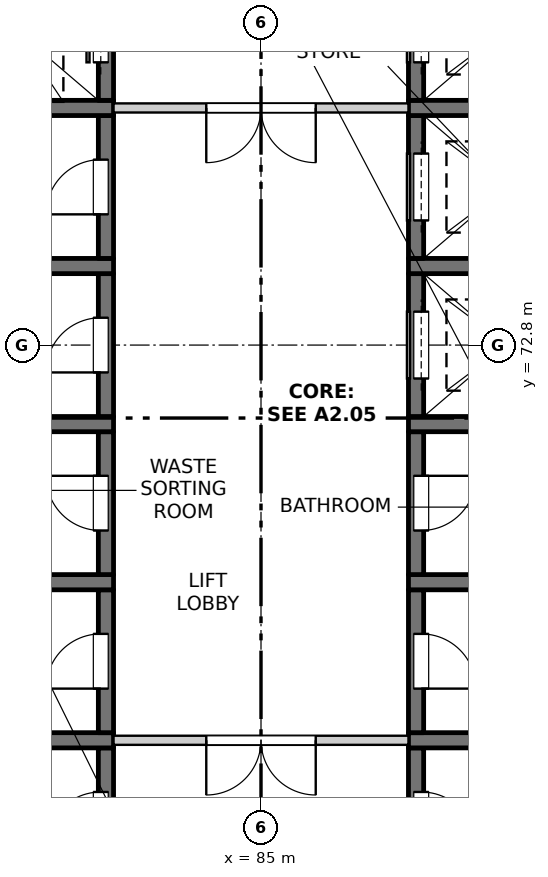
"""IFC4 building model, lengths in metres.
Left out: names, types, materials, properties, quantities, classifications, styles, units other than length and angle.
Written with IfcOpenShell. Run it as: python <this file> out.ifc"""

import sys

from ifc_helpers import new_model, si_unit, direction, frame, frame_2d, origin, place, context, subcontext, project, spatial, rectangle, extrude, element, fill, save


model = new_model("IFC4")
c1 = context("Model", 3, precision=1e-05, world=origin(), true_north=direction((0.0, 1.0)))
c2 = subcontext(c1, "Body", "Model", "MODEL_VIEW")
j1 = project(units=[si_unit("LENGTHUNIT", "METRE"), si_unit("PLANEANGLEUNIT", "RADIAN")], contexts=[c1])
p1 = place(None, origin())
s1 = spatial("IfcSite", under=j1, at=p1, CompositionType="ELEMENT")
p2 = place(p1, origin())
s2 = spatial("IfcBuilding", under=s1, at=p2, CompositionType="ELEMENT")
p3 = place(p2, frame((0.0, 0.0, 231.3)))
s3 = spatial("IfcBuildingStorey", under=s2, at=p3, CompositionType="ELEMENT", Elevation=231.3)
p4 = place(p3, frame((82.45, 63.825, -0.25), z_axis=(0.0, 0.0, 1.0), x_axis=(0.0, 1.0, 0.0)))
e1 = element("IfcWall", 1, at=p4, inside=s3, PredefinedType="SOLIDWALL", context=c2, shape_type="SweptSolid", body=[
    extrude(rectangle(XDim=2.35, YDim=0.25, at=frame_2d((1.175, 0.0))), origin(), (0.0, 0.0, 1.0), 3.4),
])
p5 = place(p4, frame((0.725, 0.0, 0.25)))
e2 = element("IfcOpeningElement", 2, at=p5, cuts=e1, PredefinedType="OPENING", context=c2, shape_type="SweptSolid", body=[
    extrude(rectangle(XDim=0.9, YDim=2.1, at=frame_2d((0.45, 1.05))), frame((0.0, 0.135, 0.0), z_axis=(0.0, -1.0, 0.0), x_axis=(1.0, 0.0, 0.0)), (0.0, 0.0, 1.0), 0.27),
])
p6 = place(p3, frame((79.575, 66.3, -0.25), z_axis=(0.0, 0.0, 1.0), x_axis=(1.0, 0.0, 0.0)))
e3 = element("IfcWall", 3, at=p6, inside=s3, PredefinedType="SOLIDWALL", context=c2, shape_type="SweptSolid", body=[
    extrude(rectangle(XDim=3.0, YDim=0.25, at=frame_2d((1.5, 0.0))), origin(), (0.0, 0.0, 1.0), 3.4),
])
p7 = place(p3, frame((82.45, 66.425, -0.25), z_axis=(0.0, 0.0, 1.0), x_axis=(0.0, 1.0, 0.0)))
e4 = element("IfcWall", 4, at=p7, inside=s3, PredefinedType="SOLIDWALL", context=c2, shape_type="SweptSolid", body=[
    extrude(rectangle(XDim=2.35, YDim=0.25, at=frame_2d((1.175, 0.0))), origin(), (0.0, 0.0, 1.0), 3.4),
])
p8 = place(p7, frame((0.725, 0.0, 0.25)))
e5 = element("IfcOpeningElement", 5, at=p8, cuts=e4, PredefinedType="OPENING", context=c2, shape_type="SweptSolid", body=[
    extrude(rectangle(XDim=0.9, YDim=2.1, at=frame_2d((0.45, 1.05))), frame((0.0, 0.135, 0.0), z_axis=(0.0, -1.0, 0.0), x_axis=(1.0, 0.0, 0.0)), (0.0, 0.0, 1.0), 0.27),
])
p9 = place(p3, frame((79.575, 68.9, -0.25), z_axis=(0.0, 0.0, 1.0), x_axis=(1.0, 0.0, 0.0)))
e6 = element("IfcWall", 6, at=p9, inside=s3, PredefinedType="SOLIDWALL", context=c2, shape_type="SweptSolid", body=[
    extrude(rectangle(XDim=3.0, YDim=0.25, at=frame_2d((1.5, 0.0))), origin(), (0.0, 0.0, 1.0), 3.4),
])
p10 = place(p3, frame((82.45, 69.025, -0.25), z_axis=(0.0, 0.0, 1.0), x_axis=(0.0, 1.0, 0.0)))
e7 = element("IfcWall", 7, at=p10, inside=s3, PredefinedType="SOLIDWALL", context=c2, shape_type="SweptSolid", body=[
    extrude(rectangle(XDim=2.35, YDim=0.25, at=frame_2d((1.175, 0.0))), origin(), (0.0, 0.0, 1.0), 3.4),
])
p11 = place(p10, frame((0.725, 0.0, 0.25)))
e8 = element("IfcOpeningElement", 8, at=p11, cuts=e7, PredefinedType="OPENING", context=c2, shape_type="SweptSolid", body=[
    extrude(rectangle(XDim=0.9, YDim=2.1, at=frame_2d((0.45, 1.05))), frame((0.0, 0.135, 0.0), z_axis=(0.0, -1.0, 0.0), x_axis=(1.0, 0.0, 0.0)), (0.0, 0.0, 1.0), 0.27),
])
p12 = place(p3, frame((79.575, 71.5, -0.25), z_axis=(0.0, 0.0, 1.0), x_axis=(1.0, 0.0, 0.0)))
e9 = element("IfcWall", 9, at=p12, inside=s3, PredefinedType="SOLIDWALL", context=c2, shape_type="SweptSolid", body=[
    extrude(rectangle(XDim=3.0, YDim=0.25, at=frame_2d((1.5, 0.0))), origin(), (0.0, 0.0, 1.0), 3.4),
])
p13 = place(p3, frame((82.45, 71.625, -0.25), z_axis=(0.0, 0.0, 1.0), x_axis=(0.0, 1.0, 0.0)))
e10 = element("IfcWall", 10, at=p13, inside=s3, PredefinedType="SOLIDWALL", context=c2, shape_type="SweptSolid", body=[
    extrude(rectangle(XDim=2.35, YDim=0.25, at=frame_2d((1.175, 0.0))), origin(), (0.0, 0.0, 1.0), 3.4),
])
p14 = place(p13, frame((0.725, 0.0, 0.25)))
e11 = element("IfcOpeningElement", 11, at=p14, cuts=e10, PredefinedType="OPENING", context=c2, shape_type="SweptSolid", body=[
    extrude(rectangle(XDim=0.9, YDim=2.1, at=frame_2d((0.45, 1.05))), frame((0.0, 0.135, 0.0), z_axis=(0.0, -1.0, 0.0), x_axis=(1.0, 0.0, 0.0)), (0.0, 0.0, 1.0), 0.27),
])
p15 = place(p3, frame((79.575, 74.1, -0.25), z_axis=(0.0, 0.0, 1.0), x_axis=(1.0, 0.0, 0.0)))
e12 = element("IfcWall", 12, at=p15, inside=s3, PredefinedType="SOLIDWALL", context=c2, shape_type="SweptSolid", body=[
    extrude(rectangle(XDim=3.0, YDim=0.25, at=frame_2d((1.5, 0.0))), origin(), (0.0, 0.0, 1.0), 3.4),
])
p16 = place(p3, frame((82.45, 74.225, -0.25), z_axis=(0.0, 0.0, 1.0), x_axis=(0.0, 1.0, 0.0)))
e13 = element("IfcWall", 13, at=p16, inside=s3, PredefinedType="SOLIDWALL", context=c2, shape_type="SweptSolid", body=[
    extrude(rectangle(XDim=2.35, YDim=0.25, at=frame_2d((1.175, 0.0))), origin(), (0.0, 0.0, 1.0), 3.4),
])
p17 = place(p16, frame((0.725, 0.0, 0.25)))
e14 = element("IfcOpeningElement", 14, at=p17, cuts=e13, PredefinedType="OPENING", context=c2, shape_type="SweptSolid", body=[
    extrude(rectangle(XDim=0.9, YDim=2.1, at=frame_2d((0.45, 1.05))), frame((0.0, 0.135, 0.0), z_axis=(0.0, -1.0, 0.0), x_axis=(1.0, 0.0, 0.0)), (0.0, 0.0, 1.0), 0.27),
])
p18 = place(p3, frame((79.575, 76.7, -0.25), z_axis=(0.0, 0.0, 1.0), x_axis=(1.0, 0.0, 0.0)))
e15 = element("IfcWall", 15, at=p18, inside=s3, PredefinedType="SOLIDWALL", context=c2, shape_type="SweptSolid", body=[
    extrude(rectangle(XDim=3.0, YDim=0.25, at=frame_2d((1.5, 0.0))), origin(), (0.0, 0.0, 1.0), 3.4),
])
p19 = place(p3, frame((82.45, 76.825, -0.25), z_axis=(0.0, 0.0, 1.0), x_axis=(0.0, 1.0, 0.0)))
e16 = element("IfcWall", 16, at=p19, inside=s3, PredefinedType="SOLIDWALL", context=c2, shape_type="SweptSolid", body=[
    extrude(rectangle(XDim=2.35, YDim=0.25, at=frame_2d((1.175, 0.0))), origin(), (0.0, 0.0, 1.0), 3.4),
])
p20 = place(p19, frame((0.625, 0.0, 0.25)))
e17 = element("IfcOpeningElement", 17, at=p20, cuts=e16, PredefinedType="OPENING", context=c2, shape_type="SweptSolid", body=[
    extrude(rectangle(XDim=1.1, YDim=2.1, at=frame_2d((0.55, 1.05))), frame((0.0, 0.135, 0.0), z_axis=(0.0, -1.0, 0.0), x_axis=(1.0, 0.0, 0.0)), (0.0, 0.0, 1.0), 0.27),
])
p21 = place(p3, frame((87.55, 63.825, -0.25), z_axis=(0.0, 0.0, 1.0), x_axis=(0.0, 1.0, 0.0)))
e18 = element("IfcWall", 18, at=p21, inside=s3, PredefinedType="SOLIDWALL", context=c2, shape_type="SweptSolid", body=[
    extrude(rectangle(XDim=2.35, YDim=0.25, at=frame_2d((1.175, 0.0))), origin(), (0.0, 0.0, 1.0), 3.4),
])
p22 = place(p21, frame((0.725, 0.0, 0.25)))
e19 = element("IfcOpeningElement", 19, at=p22, cuts=e18, PredefinedType="OPENING", context=c2, shape_type="SweptSolid", body=[
    extrude(rectangle(XDim=0.9, YDim=2.1, at=frame_2d((0.45, 1.05))), frame((0.0, 0.135, 0.0), z_axis=(0.0, -1.0, 0.0), x_axis=(1.0, 0.0, 0.0)), (0.0, 0.0, 1.0), 0.27),
])
p23 = place(p3, frame((87.425, 66.3, -0.25), z_axis=(0.0, 0.0, 1.0), x_axis=(1.0, 0.0, 0.0)))
e20 = element("IfcWall", 20, at=p23, inside=s3, PredefinedType="SOLIDWALL", context=c2, shape_type="SweptSolid", body=[
    extrude(rectangle(XDim=3.0, YDim=0.25, at=frame_2d((1.5, 0.0))), origin(), (0.0, 0.0, 1.0), 3.4),
])
p24 = place(p3, frame((87.55, 66.425, -0.25), z_axis=(0.0, 0.0, 1.0), x_axis=(0.0, 1.0, 0.0)))
e21 = element("IfcWall", 21, at=p24, inside=s3, PredefinedType="SOLIDWALL", context=c2, shape_type="SweptSolid", body=[
    extrude(rectangle(XDim=2.35, YDim=0.25, at=frame_2d((1.175, 0.0))), origin(), (0.0, 0.0, 1.0), 3.4),
])
p25 = place(p24, frame((0.725, 0.0, 0.25)))
e22 = element("IfcOpeningElement", 22, at=p25, cuts=e21, PredefinedType="OPENING", context=c2, shape_type="SweptSolid", body=[
    extrude(rectangle(XDim=0.9, YDim=2.1, at=frame_2d((0.45, 1.05))), frame((0.0, 0.135, 0.0), z_axis=(0.0, -1.0, 0.0), x_axis=(1.0, 0.0, 0.0)), (0.0, 0.0, 1.0), 0.27),
])
p26 = place(p3, frame((87.425, 68.9, -0.25), z_axis=(0.0, 0.0, 1.0), x_axis=(1.0, 0.0, 0.0)))
e23 = element("IfcWall", 23, at=p26, inside=s3, PredefinedType="SOLIDWALL", context=c2, shape_type="SweptSolid", body=[
    extrude(rectangle(XDim=3.0, YDim=0.25, at=frame_2d((1.5, 0.0))), origin(), (0.0, 0.0, 1.0), 3.4),
])
p27 = place(p3, frame((87.55, 69.025, -0.25), z_axis=(0.0, 0.0, 1.0), x_axis=(0.0, 1.0, 0.0)))
e24 = element("IfcWall", 24, at=p27, inside=s3, PredefinedType="SOLIDWALL", context=c2, shape_type="SweptSolid", body=[
    extrude(rectangle(XDim=2.35, YDim=0.25, at=frame_2d((1.175, 0.0))), origin(), (0.0, 0.0, 1.0), 3.4),
])
p28 = place(p27, frame((0.725, 0.0, 0.25)))
e25 = element("IfcOpeningElement", 25, at=p28, cuts=e24, PredefinedType="OPENING", context=c2, shape_type="SweptSolid", body=[
    extrude(rectangle(XDim=0.9, YDim=2.1, at=frame_2d((0.45, 1.05))), frame((0.0, 0.135, 0.0), z_axis=(0.0, -1.0, 0.0), x_axis=(1.0, 0.0, 0.0)), (0.0, 0.0, 1.0), 0.27),
])
p29 = place(p3, frame((87.425, 71.5, -0.25), z_axis=(0.0, 0.0, 1.0), x_axis=(1.0, 0.0, 0.0)))
e26 = element("IfcWall", 26, at=p29, inside=s3, PredefinedType="SOLIDWALL", context=c2, shape_type="SweptSolid", body=[
    extrude(rectangle(XDim=3.0, YDim=0.25, at=frame_2d((1.5, 0.0))), origin(), (0.0, 0.0, 1.0), 3.4),
])
p30 = place(p3, frame((87.55, 71.625, -0.25), z_axis=(0.0, 0.0, 1.0), x_axis=(0.0, 1.0, 0.0)))
e27 = element("IfcWall", 27, at=p30, inside=s3, PredefinedType="SOLIDWALL", context=c2, shape_type="SweptSolid", body=[
    extrude(rectangle(XDim=2.35, YDim=0.25, at=frame_2d((1.175, 0.0))), origin(), (0.0, 0.0, 1.0), 3.4),
])
p31 = place(p30, frame((0.625, 0.0, 0.25)))
e28 = element("IfcOpeningElement", 28, at=p31, cuts=e27, PredefinedType="OPENING", context=c2, shape_type="SweptSolid", body=[
    extrude(rectangle(XDim=1.1, YDim=2.1, at=frame_2d((0.55, 1.05))), frame((0.0, 0.135, 0.0), z_axis=(0.0, -1.0, 0.0), x_axis=(1.0, 0.0, 0.0)), (0.0, 0.0, 1.0), 0.27),
])
p32 = place(p3, frame((87.425, 74.1, -0.25), z_axis=(0.0, 0.0, 1.0), x_axis=(1.0, 0.0, 0.0)))
e29 = element("IfcWall", 29, at=p32, inside=s3, PredefinedType="SOLIDWALL", context=c2, shape_type="SweptSolid", body=[
    extrude(rectangle(XDim=3.0, YDim=0.25, at=frame_2d((1.5, 0.0))), origin(), (0.0, 0.0, 1.0), 3.4),
])
p33 = place(p3, frame((87.55, 74.225, -0.25), z_axis=(0.0, 0.0, 1.0), x_axis=(0.0, 1.0, 0.0)))
e30 = element("IfcWall", 30, at=p33, inside=s3, PredefinedType="SOLIDWALL", context=c2, shape_type="SweptSolid", body=[
    extrude(rectangle(XDim=2.35, YDim=0.25, at=frame_2d((1.175, 0.0))), origin(), (0.0, 0.0, 1.0), 3.4),
])
p34 = place(p33, frame((0.625, 0.0, 0.25)))
e31 = element("IfcOpeningElement", 31, at=p34, cuts=e30, PredefinedType="OPENING", context=c2, shape_type="SweptSolid", body=[
    extrude(rectangle(XDim=1.1, YDim=2.1, at=frame_2d((0.55, 1.05))), frame((0.0, 0.135, 0.0), z_axis=(0.0, -1.0, 0.0), x_axis=(1.0, 0.0, 0.0)), (0.0, 0.0, 1.0), 0.27),
])
p35 = place(p3, frame((87.425, 76.7, -0.25), z_axis=(0.0, 0.0, 1.0), x_axis=(1.0, 0.0, 0.0)))
e32 = element("IfcWall", 32, at=p35, inside=s3, PredefinedType="SOLIDWALL", context=c2, shape_type="SweptSolid", body=[
    extrude(rectangle(XDim=3.0, YDim=0.25, at=frame_2d((1.5, 0.0))), origin(), (0.0, 0.0, 1.0), 3.4),
])
p36 = place(p3, frame((87.55, 76.825, -0.25), z_axis=(0.0, 0.0, 1.0), x_axis=(0.0, 1.0, 0.0)))
e33 = element("IfcWall", 33, at=p36, inside=s3, PredefinedType="SOLIDWALL", context=c2, shape_type="SweptSolid", body=[
    extrude(rectangle(XDim=2.35, YDim=0.25, at=frame_2d((1.175, 0.0))), origin(), (0.0, 0.0, 1.0), 3.4),
])
p37 = place(p36, frame((0.625, 0.0, 0.25)))
e34 = element("IfcOpeningElement", 34, at=p37, cuts=e33, PredefinedType="OPENING", context=c2, shape_type="SweptSolid", body=[
    extrude(rectangle(XDim=1.1, YDim=2.1, at=frame_2d((0.55, 1.05))), frame((0.0, 0.135, 0.0), z_axis=(0.0, -1.0, 0.0), x_axis=(1.0, 0.0, 0.0)), (0.0, 0.0, 1.0), 0.27),
])
p38 = place(p3, frame((82.575, 66.3, 0.0), z_axis=(0.0, 0.0, 1.0), x_axis=(1.0, 0.0, 0.0)))
e35 = element("IfcWall", 35, at=p38, inside=s3, PredefinedType="PARTITIONING", context=c2, shape_type="SweptSolid", body=[
    extrude(rectangle(XDim=4.85, YDim=0.15, at=frame_2d((2.425, 0.0))), origin(), (0.0, 0.0, 1.0), 3.15),
])
p39 = place(p38, frame((1.525, 0.0, 0.0)))
e36 = element("IfcOpeningElement", 36, at=p39, cuts=e35, PredefinedType="OPENING", context=c2, shape_type="SweptSolid", body=[
    extrude(rectangle(XDim=1.8, YDim=2.1, at=frame_2d((0.9, 1.05))), frame((0.0, 0.085, 0.0), z_axis=(0.0, -1.0, 0.0), x_axis=(1.0, 0.0, 0.0)), (0.0, 0.0, 1.0), 0.17),
])
p40 = place(p3, frame((82.575, 76.7, 0.0), z_axis=(0.0, 0.0, 1.0), x_axis=(1.0, 0.0, 0.0)))
e37 = element("IfcWall", 37, at=p40, inside=s3, PredefinedType="PARTITIONING", context=c2, shape_type="SweptSolid", body=[
    extrude(rectangle(XDim=4.85, YDim=0.15, at=frame_2d((2.425, 0.0))), origin(), (0.0, 0.0, 1.0), 3.15),
])
p41 = place(p40, frame((1.525, 0.0, 0.0)))
e38 = element("IfcOpeningElement", 38, at=p41, cuts=e37, PredefinedType="OPENING", context=c2, shape_type="SweptSolid", body=[
    extrude(rectangle(XDim=1.8, YDim=2.1, at=frame_2d((0.9, 1.05))), frame((0.0, 0.085, 0.0), z_axis=(0.0, -1.0, 0.0), x_axis=(1.0, 0.0, 0.0)), (0.0, 0.0, 1.0), 0.17),
])
p42 = place(p5, origin())
e39 = element("IfcDoor", 39, at=p42, inside=s3, OperationType="SINGLE_SWING_LEFT", PredefinedType="DOOR", context=c2, shape_type="SweptSolid", body=[
    extrude(rectangle(XDim=0.9, YDim=2.1, at=frame_2d((0.45, 1.05))), frame((0.0, 0.11, 0.0), z_axis=(0.0, -1.0, 0.0), x_axis=(1.0, 0.0, 0.0)), (0.0, 0.0, 1.0), 0.05),
])
fill(e2, e39)
p43 = place(p22, origin())
e40 = element("IfcDoor", 40, at=p43, inside=s3, OperationType="SINGLE_SWING_RIGHT", PredefinedType="DOOR", context=c2, shape_type="SweptSolid", body=[
    extrude(rectangle(XDim=0.9, YDim=2.1, at=frame_2d((0.45, 1.05))), frame((0.0, -0.06, 0.0), z_axis=(0.0, -1.0, 0.0), x_axis=(1.0, 0.0, 0.0)), (0.0, 0.0, 1.0), 0.05),
])
fill(e19, e40)
p44 = place(p39, origin())
e41 = element("IfcDoor", 41, at=p44, inside=s3, OperationType="DOUBLE_DOOR_SINGLE_SWING", PredefinedType="DOOR", context=c2, shape_type="SweptSolid", body=[
    extrude(rectangle(XDim=1.8, YDim=2.1, at=frame_2d((0.9, 1.05))), frame((0.0, 0.025, 0.0), z_axis=(0.0, -1.0, 0.0), x_axis=(1.0, 0.0, 0.0)), (0.0, 0.0, 1.0), 0.05),
])
fill(e36, e41)
p45 = place(p8, origin())
e42 = element("IfcDoor", 42, at=p45, inside=s3, OperationType="SINGLE_SWING_LEFT", PredefinedType="DOOR", context=c2, shape_type="SweptSolid", body=[
    extrude(rectangle(XDim=0.9, YDim=2.1, at=frame_2d((0.45, 1.05))), frame((0.0, 0.11, 0.0), z_axis=(0.0, -1.0, 0.0), x_axis=(1.0, 0.0, 0.0)), (0.0, 0.0, 1.0), 0.05),
])
fill(e5, e42)
p46 = place(p25, origin())
e43 = element("IfcDoor", 43, at=p46, inside=s3, OperationType="SINGLE_SWING_RIGHT", PredefinedType="DOOR", context=c2, shape_type="SweptSolid", body=[
    extrude(rectangle(XDim=0.9, YDim=2.1, at=frame_2d((0.45, 1.05))), frame((0.0, -0.06, 0.0), z_axis=(0.0, -1.0, 0.0), x_axis=(1.0, 0.0, 0.0)), (0.0, 0.0, 1.0), 0.05),
])
fill(e22, e43)
p47 = place(p11, origin())
e44 = element("IfcDoor", 44, at=p47, inside=s3, OperationType="SINGLE_SWING_RIGHT", PredefinedType="DOOR", context=c2, shape_type="SweptSolid", body=[
    extrude(rectangle(XDim=0.9, YDim=2.1, at=frame_2d((0.45, 1.05))), frame((0.0, 0.11, 0.0), z_axis=(0.0, -1.0, 0.0), x_axis=(1.0, 0.0, 0.0)), (0.0, 0.0, 1.0), 0.05),
])
fill(e8, e44)
p48 = place(p28, origin())
e45 = element("IfcDoor", 45, at=p48, inside=s3, OperationType="SINGLE_SWING_LEFT", PredefinedType="DOOR", context=c2, shape_type="SweptSolid", body=[
    extrude(rectangle(XDim=0.9, YDim=2.1, at=frame_2d((0.45, 1.05))), frame((0.0, -0.06, 0.0), z_axis=(0.0, -1.0, 0.0), x_axis=(1.0, 0.0, 0.0)), (0.0, 0.0, 1.0), 0.05),
])
fill(e25, e45)
p49 = place(p14, origin())
e46 = element("IfcDoor", 46, at=p49, inside=s3, OperationType="SINGLE_SWING_LEFT", PredefinedType="DOOR", context=c2, shape_type="SweptSolid", body=[
    extrude(rectangle(XDim=0.9, YDim=2.1, at=frame_2d((0.45, 1.05))), frame((0.0, 0.11, 0.0), z_axis=(0.0, -1.0, 0.0), x_axis=(1.0, 0.0, 0.0)), (0.0, 0.0, 1.0), 0.05),
])
fill(e11, e46)
p50 = place(p31, origin())
e47 = element("IfcDoor", 47, at=p50, inside=s3, OperationType="SLIDING_TO_LEFT", PredefinedType="DOOR", context=c2, shape_type="SweptSolid", body=[
    extrude(rectangle(XDim=1.1, YDim=2.1, at=frame_2d((0.55, 1.05))), frame((0.0, -0.06, 0.0), z_axis=(0.0, -1.0, 0.0), x_axis=(1.0, 0.0, 0.0)), (0.0, 0.0, 1.0), 0.05),
])
fill(e28, e47)
p51 = place(p17, origin())
e48 = element("IfcDoor", 48, at=p51, inside=s3, OperationType="SINGLE_SWING_LEFT", PredefinedType="DOOR", context=c2, shape_type="SweptSolid", body=[
    extrude(rectangle(XDim=0.9, YDim=2.1, at=frame_2d((0.45, 1.05))), frame((0.0, 0.11, 0.0), z_axis=(0.0, -1.0, 0.0), x_axis=(1.0, 0.0, 0.0)), (0.0, 0.0, 1.0), 0.05),
])
fill(e14, e48)
p52 = place(p34, origin())
e49 = element("IfcDoor", 49, at=p52, inside=s3, OperationType="SLIDING_TO_LEFT", PredefinedType="DOOR", context=c2, shape_type="SweptSolid", body=[
    extrude(rectangle(XDim=1.1, YDim=2.1, at=frame_2d((0.55, 1.05))), frame((0.0, -0.06, 0.0), z_axis=(0.0, -1.0, 0.0), x_axis=(1.0, 0.0, 0.0)), (0.0, 0.0, 1.0), 0.05),
])
fill(e31, e49)
p53 = place(p41, origin())
e50 = element("IfcDoor", 50, at=p53, inside=s3, OperationType="DOUBLE_DOOR_SINGLE_SWING", PredefinedType="DOOR", context=c2, shape_type="SweptSolid", body=[
    extrude(rectangle(XDim=1.8, YDim=2.1, at=frame_2d((0.9, 1.05))), frame((0.0, 0.025, 0.0), z_axis=(0.0, -1.0, 0.0), x_axis=(1.0, 0.0, 0.0)), (0.0, 0.0, 1.0), 0.05),
])
fill(e38, e50)
p54 = place(p20, origin())
e51 = element("IfcDoor", 51, at=p54, inside=s3, OperationType="SLIDING_TO_LEFT", PredefinedType="DOOR", context=c2, shape_type="SweptSolid", body=[
    extrude(rectangle(XDim=1.1, YDim=2.1, at=frame_2d((0.55, 1.05))), frame((0.0, 0.11, 0.0), z_axis=(0.0, -1.0, 0.0), x_axis=(1.0, 0.0, 0.0)), (0.0, 0.0, 1.0), 0.05),
])
fill(e17, e51)
p55 = place(p37, origin())
e52 = element("IfcDoor", 52, at=p55, inside=s3, OperationType="SLIDING_TO_LEFT", PredefinedType="DOOR", context=c2, shape_type="SweptSolid", body=[
    extrude(rectangle(XDim=1.1, YDim=2.1, at=frame_2d((0.55, 1.05))), frame((0.0, -0.06, 0.0), z_axis=(0.0, -1.0, 0.0), x_axis=(1.0, 0.0, 0.0)), (0.0, 0.0, 1.0), 0.05),
])
fill(e34, e52)
save(model, sys.argv[1])
